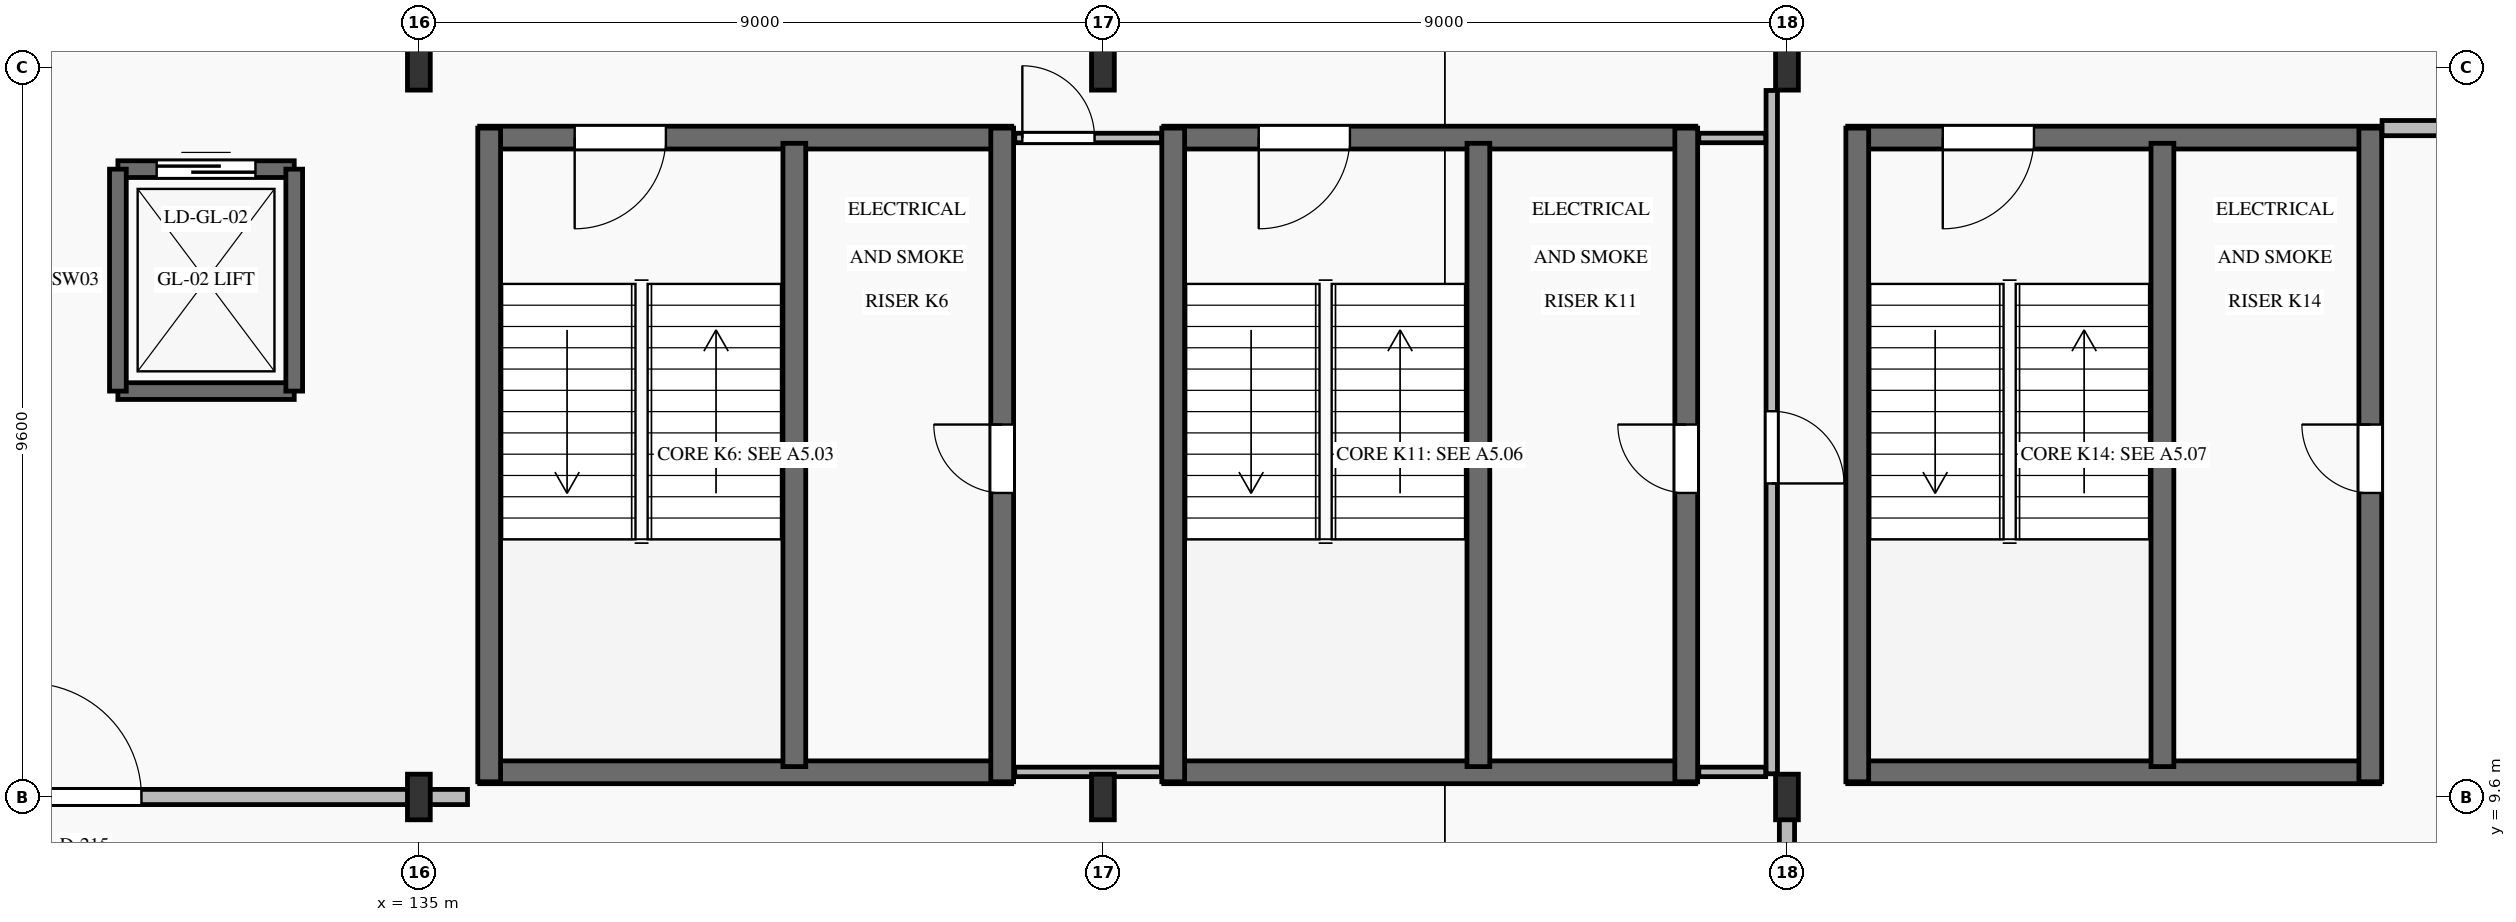
"""IFC4 building model, lengths in metres.
Left out: names, types, materials, properties, quantities, classifications, styles, units other than length and angle.
Written with IfcOpenShell. Run it as: python <this file> out.ifc"""

import sys

from ifc_helpers import new_model, si_unit, direction, frame, frame_2d, origin, origin_2d, place, context, subcontext, project, spatial, rectangle, i_section, extrude, element, fill, save


model = new_model("IFC4")
c1 = context("Model", 3, precision=1e-05, world=origin(), true_north=direction((0.0, 1.0)))
c2 = subcontext(c1, "Body", "Model", "MODEL_VIEW")
j1 = project(units=[si_unit("LENGTHUNIT", "METRE"), si_unit("PLANEANGLEUNIT", "RADIAN")], contexts=[c1])
p1 = place(None, origin())
s1 = spatial("IfcSite", under=j1, at=p1, CompositionType="ELEMENT")
p2 = place(p1, origin())
s2 = spatial("IfcBuilding", under=s1, at=p2, CompositionType="ELEMENT")
p3 = place(p2, frame((0.0, 0.0, -4.5)))
s3 = spatial("IfcBuildingStorey", under=s2, at=p3, CompositionType="ELEMENT", Elevation=-4.5)
for number, where, z_axis, x_axis in (
    (1, (135.0, 9.6, 0.0), (0.0, 0.0, 1.0), (1.0, 0.0, 0.0)),
    (2, (135.0, 19.2, 0.0), (0.0, 0.0, 1.0), (1.0, 0.0, 0.0)),
    (3, (144.0, 9.6, 0.0), (0.0, 0.0, 1.0), (1.0, 0.0, 0.0)),
    (4, (144.0, 19.2, 0.0), (0.0, 0.0, 1.0), (1.0, 0.0, 0.0)),
    (5, (153.0, 9.6, 0.0), (0.0, 0.0, 1.0), (1.0, 0.0, 0.0)),
    (6, (153.0, 19.2, 0.0), (0.0, 0.0, 1.0), (1.0, 0.0, 0.0)),
):
    element("IfcColumn", number, at=place(p3, frame(where, z_axis=z_axis, x_axis=x_axis)), inside=s3, PredefinedType="COLUMN", context=c2, shape_type="SweptSolid", body=[
        extrude(i_section(OverallWidth=0.3, OverallDepth=0.6, WebThickness=0.015, FlangeThickness=0.03, FilletRadius=0.027, at=origin_2d()), origin(), (0.0, 0.0, 1.0), 4.5),
    ])
p4 = place(p3, frame((135.8, 9.925, 0.0), z_axis=(0.0, 0.0, 1.0), x_axis=(1.0, 0.0, 0.0)))
e7 = element("IfcWall", 7, at=p4, inside=s3, PredefinedType="SHEAR", context=c2, shape_type="SweptSolid", body=[
    extrude(rectangle(XDim=7.0, YDim=0.3, at=frame_2d((3.5, 0.0))), origin(), (0.0, 0.0, 1.0), 4.5),
])
p5 = place(p3, frame((135.8, 18.275, 0.0), z_axis=(0.0, 0.0, 1.0), x_axis=(1.0, 0.0, 0.0)))
e8 = element("IfcWall", 8, at=p5, inside=s3, PredefinedType="SHEAR", context=c2, shape_type="SweptSolid", body=[
    extrude(rectangle(XDim=7.0, YDim=0.3, at=frame_2d((3.5, 0.0))), origin(), (0.0, 0.0, 1.0), 4.5),
])
p6 = place(p5, frame((1.25, 0.0, 0.0)))
e9 = element("IfcOpeningElement", 9, at=p6, cuts=e8, PredefinedType="OPENING", context=c2, shape_type="SweptSolid", body=[
    extrude(rectangle(XDim=1.2, YDim=2.15, at=frame_2d((0.6, 1.075))), frame((0.0, 0.165, 0.0), z_axis=(0.0, -1.0, 0.0), x_axis=(1.0, 0.0, 0.0)), (0.0, 0.0, 1.0), 0.33),
])
p7 = place(p3, frame((135.925, 9.8, 0.0), z_axis=(0.0, 0.0, 1.0), x_axis=(0.0, 1.0, 0.0)))
e10 = element("IfcWall", 10, at=p7, inside=s3, PredefinedType="SHEAR", context=c2, shape_type="SweptSolid", body=[
    extrude(rectangle(XDim=8.6, YDim=0.3, at=frame_2d((4.3, 0.0))), origin(), (0.0, 0.0, 1.0), 4.5),
])
p8 = place(p3, frame((142.675, 9.8, 0.0), z_axis=(0.0, 0.0, 1.0), x_axis=(0.0, 1.0, 0.0)))
e11 = element("IfcWall", 11, at=p8, inside=s3, PredefinedType="SHEAR", context=c2, shape_type="SweptSolid", body=[
    extrude(rectangle(XDim=8.6, YDim=0.3, at=frame_2d((4.3, 0.0))), origin(), (0.0, 0.0, 1.0), 4.5),
])
p9 = place(p8, frame((3.8, 0.0, 0.0)))
e12 = element("IfcOpeningElement", 12, at=p9, cuts=e11, PredefinedType="OPENING", context=c2, shape_type="SweptSolid", body=[
    extrude(rectangle(XDim=0.9, YDim=2.05, at=frame_2d((0.45, 1.025))), frame((0.0, 0.165, 0.0), z_axis=(0.0, -1.0, 0.0), x_axis=(1.0, 0.0, 0.0)), (0.0, 0.0, 1.0), 0.33),
])
p10 = place(p3, frame((139.94, 10.0, 0.0), z_axis=(0.0, 0.0, 1.0), x_axis=(0.0, 1.0, 0.0)))
e13 = element("IfcWall", 13, at=p10, inside=s3, PredefinedType="SHEAR", context=c2, shape_type="SweptSolid", body=[
    extrude(rectangle(XDim=8.2, YDim=0.3, at=frame_2d((4.1, 0.0))), origin(), (0.0, 0.0, 1.0), 4.5),
])
p11 = place(p3, frame((144.8, 9.925, 0.0), z_axis=(0.0, 0.0, 1.0), x_axis=(1.0, 0.0, 0.0)))
e14 = element("IfcWall", 14, at=p11, inside=s3, PredefinedType="SHEAR", context=c2, shape_type="SweptSolid", body=[
    extrude(rectangle(XDim=7.0, YDim=0.3, at=frame_2d((3.5, 0.0))), origin(), (0.0, 0.0, 1.0), 4.5),
])
p12 = place(p3, frame((144.8, 18.275, 0.0), z_axis=(0.0, 0.0, 1.0), x_axis=(1.0, 0.0, 0.0)))
e15 = element("IfcWall", 15, at=p12, inside=s3, PredefinedType="SHEAR", context=c2, shape_type="SweptSolid", body=[
    extrude(rectangle(XDim=7.0, YDim=0.3, at=frame_2d((3.5, 0.0))), origin(), (0.0, 0.0, 1.0), 4.5),
])
p13 = place(p12, frame((1.25, 0.0, 0.0)))
e16 = element("IfcOpeningElement", 16, at=p13, cuts=e15, PredefinedType="OPENING", context=c2, shape_type="SweptSolid", body=[
    extrude(rectangle(XDim=1.2, YDim=2.15, at=frame_2d((0.6, 1.075))), frame((0.0, 0.165, 0.0), z_axis=(0.0, -1.0, 0.0), x_axis=(1.0, 0.0, 0.0)), (0.0, 0.0, 1.0), 0.33),
])
p14 = place(p3, frame((144.925, 9.8, 0.0), z_axis=(0.0, 0.0, 1.0), x_axis=(0.0, 1.0, 0.0)))
e17 = element("IfcWall", 17, at=p14, inside=s3, PredefinedType="SHEAR", context=c2, shape_type="SweptSolid", body=[
    extrude(rectangle(XDim=8.6, YDim=0.3, at=frame_2d((4.3, 0.0))), origin(), (0.0, 0.0, 1.0), 4.5),
])
p15 = place(p3, frame((151.675, 9.8, 0.0), z_axis=(0.0, 0.0, 1.0), x_axis=(0.0, 1.0, 0.0)))
e18 = element("IfcWall", 18, at=p15, inside=s3, PredefinedType="SHEAR", context=c2, shape_type="SweptSolid", body=[
    extrude(rectangle(XDim=8.6, YDim=0.3, at=frame_2d((4.3, 0.0))), origin(), (0.0, 0.0, 1.0), 4.5),
])
p16 = place(p15, frame((3.8, 0.0, 0.0)))
e19 = element("IfcOpeningElement", 19, at=p16, cuts=e18, PredefinedType="OPENING", context=c2, shape_type="SweptSolid", body=[
    extrude(rectangle(XDim=0.9, YDim=2.05, at=frame_2d((0.45, 1.025))), frame((0.0, 0.165, 0.0), z_axis=(0.0, -1.0, 0.0), x_axis=(1.0, 0.0, 0.0)), (0.0, 0.0, 1.0), 0.33),
])
p17 = place(p3, frame((148.94, 10.0, 0.0), z_axis=(0.0, 0.0, 1.0), x_axis=(0.0, 1.0, 0.0)))
e20 = element("IfcWall", 20, at=p17, inside=s3, PredefinedType="SHEAR", context=c2, shape_type="SweptSolid", body=[
    extrude(rectangle(XDim=8.2, YDim=0.3, at=frame_2d((4.1, 0.0))), origin(), (0.0, 0.0, 1.0), 4.5),
])
p18 = place(p3, frame((153.8, 9.925, 0.0), z_axis=(0.0, 0.0, 1.0), x_axis=(1.0, 0.0, 0.0)))
e21 = element("IfcWall", 21, at=p18, inside=s3, PredefinedType="SHEAR", context=c2, shape_type="SweptSolid", body=[
    extrude(rectangle(XDim=7.0, YDim=0.3, at=frame_2d((3.5, 0.0))), origin(), (0.0, 0.0, 1.0), 4.5),
])
p19 = place(p3, frame((153.8, 18.275, 0.0), z_axis=(0.0, 0.0, 1.0), x_axis=(1.0, 0.0, 0.0)))
e22 = element("IfcWall", 22, at=p19, inside=s3, PredefinedType="SHEAR", context=c2, shape_type="SweptSolid", body=[
    extrude(rectangle(XDim=7.0, YDim=0.3, at=frame_2d((3.5, 0.0))), origin(), (0.0, 0.0, 1.0), 4.5),
])
p20 = place(p19, frame((1.25, 0.0, 0.0)))
e23 = element("IfcOpeningElement", 23, at=p20, cuts=e22, PredefinedType="OPENING", context=c2, shape_type="SweptSolid", body=[
    extrude(rectangle(XDim=1.2, YDim=2.15, at=frame_2d((0.6, 1.075))), frame((0.0, 0.165, 0.0), z_axis=(0.0, -1.0, 0.0), x_axis=(1.0, 0.0, 0.0)), (0.0, 0.0, 1.0), 0.33),
])
p21 = place(p3, frame((153.925, 9.8, 0.0), z_axis=(0.0, 0.0, 1.0), x_axis=(0.0, 1.0, 0.0)))
e24 = element("IfcWall", 24, at=p21, inside=s3, PredefinedType="SHEAR", context=c2, shape_type="SweptSolid", body=[
    extrude(rectangle(XDim=8.6, YDim=0.3, at=frame_2d((4.3, 0.0))), origin(), (0.0, 0.0, 1.0), 4.5),
])
p22 = place(p3, frame((160.675, 9.8, 0.0), z_axis=(0.0, 0.0, 1.0), x_axis=(0.0, 1.0, 0.0)))
e25 = element("IfcWall", 25, at=p22, inside=s3, PredefinedType="SHEAR", context=c2, shape_type="SweptSolid", body=[
    extrude(rectangle(XDim=8.6, YDim=0.3, at=frame_2d((4.3, 0.0))), origin(), (0.0, 0.0, 1.0), 4.5),
])
p23 = place(p22, frame((3.8, 0.0, 0.0)))
e26 = element("IfcOpeningElement", 26, at=p23, cuts=e25, PredefinedType="OPENING", context=c2, shape_type="SweptSolid", body=[
    extrude(rectangle(XDim=0.9, YDim=2.05, at=frame_2d((0.45, 1.025))), frame((0.0, 0.165, 0.0), z_axis=(0.0, -1.0, 0.0), x_axis=(1.0, 0.0, 0.0)), (0.0, 0.0, 1.0), 0.33),
])
p24 = place(p3, frame((157.94, 10.0, 0.0), z_axis=(0.0, 0.0, 1.0), x_axis=(0.0, 1.0, 0.0)))
e27 = element("IfcWall", 27, at=p24, inside=s3, PredefinedType="SHEAR", context=c2, shape_type="SweptSolid", body=[
    extrude(rectangle(XDim=8.2, YDim=0.3, at=frame_2d((4.1, 0.0))), origin(), (0.0, 0.0, 1.0), 4.5),
])
p25 = place(p3, frame((131.04, 14.94, 0.0), z_axis=(0.0, 0.0, 1.0), x_axis=(1.0, 0.0, 0.0)))
e28 = element("IfcWall", 28, at=p25, inside=s3, PredefinedType="SHEAR", context=c2, shape_type="SweptSolid", body=[
    extrude(rectangle(XDim=2.32, YDim=0.22, at=frame_2d((1.16, 0.0))), origin(), (0.0, 0.0, 1.0), 4.5),
])
p26 = place(p3, frame((131.04, 17.86, 0.0), z_axis=(0.0, 0.0, 1.0), x_axis=(1.0, 0.0, 0.0)))
e29 = element("IfcWall", 29, at=p26, inside=s3, PredefinedType="SHEAR", context=c2, shape_type="SweptSolid", body=[
    extrude(rectangle(XDim=2.32, YDim=0.22, at=frame_2d((1.16, 0.0))), origin(), (0.0, 0.0, 1.0), 4.5),
])
p27 = place(p26, frame((0.51, 0.0, 0.0)))
e30 = element("IfcOpeningElement", 30, at=p27, cuts=e29, PredefinedType="OPENING", context=c2, shape_type="SweptSolid", body=[
    extrude(rectangle(XDim=1.3, YDim=2.25, at=frame_2d((0.65, 1.125))), frame((0.0, 0.125, 0.0), z_axis=(0.0, -1.0, 0.0), x_axis=(1.0, 0.0, 0.0)), (0.0, 0.0, 1.0), 0.25),
])
for number, where, z_axis, x_axis in (
    (31, (131.04, 14.94, 0.0), (0.0, 0.0, 1.0), (0.0, 1.0, 0.0)),
    (32, (133.36, 14.94, 0.0), (0.0, 0.0, 1.0), (0.0, 1.0, 0.0)),
):
    element("IfcWall", number, at=place(p3, frame(where, z_axis=z_axis, x_axis=x_axis)), inside=s3, PredefinedType="SHEAR", context=c2, shape_type="SweptSolid", body=[
        extrude(rectangle(XDim=2.92, YDim=0.22, at=frame_2d((1.46, 0.0))), origin(), (0.0, 0.0, 1.0), 4.5),
    ])
p28 = place(p3, frame((160.83, 18.4, 0.0), z_axis=(0.0, 0.0, 1.0), x_axis=(1.0, 0.0, 0.0)))
e33 = element("IfcWall", 33, at=p28, inside=s3, PredefinedType="PARTITIONING", context=c2, shape_type="SweptSolid", body=[
    extrude(rectangle(XDim=18.535, YDim=0.2, at=frame_2d((9.268, 0.0))), origin(), (0.0, 0.0, 1.0), 4.2),
])
p29 = place(p28, frame((7.025, 0.0, 0.0)))
e34 = element("IfcOpeningElement", 34, at=p29, cuts=e33, PredefinedType="OPENING", context=c2, shape_type="SweptSolid", body=[
    extrude(rectangle(XDim=1.5, YDim=2.25, at=frame_2d((0.75, 1.125))), frame((0.0, 0.115, 0.0), z_axis=(0.0, -1.0, 0.0), x_axis=(1.0, 0.0, 0.0)), (0.0, 0.0, 1.0), 0.23),
])
p30 = place(p3, frame((152.8, 9.905, 0.0), z_axis=(0.0, 0.0, 1.0), x_axis=(0.0, 1.0, 0.0)))
e35 = element("IfcWall", 35, at=p30, inside=s3, PredefinedType="PARTITIONING", context=c2, shape_type="SweptSolid", body=[
    extrude(rectangle(XDim=8.99, YDim=0.15, at=frame_2d((4.495, 0.0))), origin(), (0.0, 0.0, 1.0), 3.66),
])
p31 = place(p30, frame((3.82, 0.0, 0.0)))
e36 = element("IfcOpeningElement", 36, at=p31, cuts=e35, PredefinedType="OPENING", context=c2, shape_type="SweptSolid", body=[
    extrude(rectangle(XDim=0.95, YDim=2.1, at=frame_2d((0.475, 1.05))), frame((0.0, 0.09, 0.0), z_axis=(0.0, -1.0, 0.0), x_axis=(1.0, 0.0, 0.0)), (0.0, 0.0, 1.0), 0.18),
])
p32 = place(p3, frame((125.56, 9.6, 0.0), z_axis=(0.0, 0.0, 1.0), x_axis=(1.0, 0.0, 0.0)))
e37 = element("IfcWall", 37, at=p32, inside=s3, PredefinedType="PARTITIONING", context=c2, shape_type="SweptSolid", body=[
    extrude(rectangle(XDim=10.08, YDim=0.2, at=frame_2d((5.04, 0.0))), origin(), (0.0, 0.0, 1.0), 3.61),
])
p33 = place(p32, frame((4.29, 0.0, 0.0)))
e38 = element("IfcOpeningElement", 38, at=p33, cuts=e37, PredefinedType="OPENING", context=c2, shape_type="SweptSolid", body=[
    extrude(rectangle(XDim=1.5, YDim=2.25, at=frame_2d((0.75, 1.125))), frame((0.0, 0.115, 0.0), z_axis=(0.0, -1.0, 0.0), x_axis=(1.0, 0.0, 0.0)), (0.0, 0.0, 1.0), 0.23),
])
p34 = place(p3, frame((153.0, 0.475, 0.0), z_axis=(0.0, 0.0, 1.0), x_axis=(0.0, 1.0, 0.0)))
e39 = element("IfcWall", 39, at=p34, inside=s3, PredefinedType="PARTITIONING", context=c2, shape_type="SweptSolid", body=[
    extrude(rectangle(XDim=8.875, YDim=0.2, at=frame_2d((4.438, 0.0))), origin(), (0.0, 0.0, 1.0), 4.2),
])
p35 = place(p3, frame((142.84, 18.27, 0.0), z_axis=(0.0, 0.0, 1.0), x_axis=(1.0, 0.0, 0.0)))
e40 = element("IfcWall", 40, at=p35, inside=s3, PredefinedType="PARTITIONING", context=c2, shape_type="SweptSolid", body=[
    extrude(rectangle(XDim=1.93, YDim=0.125, at=frame_2d((0.965, 0.0))), origin(), (0.0, 0.0, 1.0), 4.2),
])
p36 = place(p35, frame((0.1, 0.0, 0.0)))
e41 = element("IfcOpeningElement", 41, at=p36, cuts=e40, PredefinedType="OPENING", context=c2, shape_type="SweptSolid", body=[
    extrude(rectangle(XDim=0.95, YDim=2.1, at=frame_2d((0.475, 1.05))), frame((0.0, 0.077, 0.0), z_axis=(0.0, -1.0, 0.0), x_axis=(1.0, 0.0, 0.0)), (0.0, 0.0, 1.0), 0.155),
])
p37 = place(p3, frame((142.84, 9.93, 0.0), z_axis=(0.0, 0.0, 1.0), x_axis=(1.0, 0.0, 0.0)))
e42 = element("IfcWall", 42, at=p37, inside=s3, PredefinedType="PARTITIONING", context=c2, shape_type="SweptSolid", body=[
    extrude(rectangle(XDim=1.93, YDim=0.125, at=frame_2d((0.965, 0.0))), origin(), (0.0, 0.0, 1.0), 3.61),
])
p38 = place(p3, frame((151.84, 18.27, 0.0), z_axis=(0.0, 0.0, 1.0), x_axis=(1.0, 0.0, 0.0)))
e43 = element("IfcWall", 43, at=p38, inside=s3, PredefinedType="PARTITIONING", context=c2, shape_type="SweptSolid", body=[
    extrude(rectangle(XDim=0.88, YDim=0.125, at=frame_2d((0.44, 0.0))), origin(), (0.0, 0.0, 1.0), 4.2),
])
p39 = place(p3, frame((151.84, 9.93, 0.0), z_axis=(0.0, 0.0, 1.0), x_axis=(1.0, 0.0, 0.0)))
e44 = element("IfcWall", 44, at=p39, inside=s3, PredefinedType="PARTITIONING", context=c2, shape_type="SweptSolid", body=[
    extrude(rectangle(XDim=0.88, YDim=0.125, at=frame_2d((0.44, 0.0))), origin(), (0.0, 0.0, 1.0), 3.61),
])
p40 = place(p6, frame((1.2, 0.0, 0.0), z_axis=(0.0, 0.0, 1.0), x_axis=(-1.0, 0.0, 0.0)))
e45 = element("IfcDoor", 45, at=p40, inside=s3, OperationType="SINGLE_SWING_LEFT", PredefinedType="DOOR", context=c2, shape_type="SweptSolid", body=[
    extrude(rectangle(XDim=1.2, YDim=2.15, at=frame_2d((0.6, 1.075))), frame((0.0, 0.025, 0.0), z_axis=(0.0, -1.0, 0.0), x_axis=(1.0, 0.0, 0.0)), (0.0, 0.0, 1.0), 0.05),
])
fill(e9, e45)
p41 = place(p9, origin())
e46 = element("IfcDoor", 46, at=p41, inside=s3, OperationType="SINGLE_SWING_RIGHT", PredefinedType="DOOR", context=c2, shape_type="SweptSolid", body=[
    extrude(rectangle(XDim=0.9, YDim=2.05, at=frame_2d((0.45, 1.025))), frame((0.0, 0.025, 0.0), z_axis=(0.0, -1.0, 0.0), x_axis=(1.0, 0.0, 0.0)), (0.0, 0.0, 1.0), 0.05),
])
fill(e12, e46)
p42 = place(p13, frame((1.2, 0.0, 0.0), z_axis=(0.0, 0.0, 1.0), x_axis=(-1.0, 0.0, 0.0)))
e47 = element("IfcDoor", 47, at=p42, inside=s3, OperationType="SINGLE_SWING_LEFT", PredefinedType="DOOR", context=c2, shape_type="SweptSolid", body=[
    extrude(rectangle(XDim=1.2, YDim=2.15, at=frame_2d((0.6, 1.075))), frame((0.0, 0.025, 0.0), z_axis=(0.0, -1.0, 0.0), x_axis=(1.0, 0.0, 0.0)), (0.0, 0.0, 1.0), 0.05),
])
fill(e16, e47)
p43 = place(p16, origin())
e48 = element("IfcDoor", 48, at=p43, inside=s3, OperationType="SINGLE_SWING_RIGHT", PredefinedType="DOOR", context=c2, shape_type="SweptSolid", body=[
    extrude(rectangle(XDim=0.9, YDim=2.05, at=frame_2d((0.45, 1.025))), frame((0.0, 0.025, 0.0), z_axis=(0.0, -1.0, 0.0), x_axis=(1.0, 0.0, 0.0)), (0.0, 0.0, 1.0), 0.05),
])
fill(e19, e48)
p44 = place(p20, frame((1.2, 0.0, 0.0), z_axis=(0.0, 0.0, 1.0), x_axis=(-1.0, 0.0, 0.0)))
e49 = element("IfcDoor", 49, at=p44, inside=s3, OperationType="SINGLE_SWING_LEFT", PredefinedType="DOOR", context=c2, shape_type="SweptSolid", body=[
    extrude(rectangle(XDim=1.2, YDim=2.15, at=frame_2d((0.6, 1.075))), frame((0.0, 0.025, 0.0), z_axis=(0.0, -1.0, 0.0), x_axis=(1.0, 0.0, 0.0)), (0.0, 0.0, 1.0), 0.05),
])
fill(e23, e49)
p45 = place(p23, origin())
e50 = element("IfcDoor", 50, at=p45, inside=s3, OperationType="SINGLE_SWING_RIGHT", PredefinedType="DOOR", context=c2, shape_type="SweptSolid", body=[
    extrude(rectangle(XDim=0.9, YDim=2.05, at=frame_2d((0.45, 1.025))), frame((0.0, 0.025, 0.0), z_axis=(0.0, -1.0, 0.0), x_axis=(1.0, 0.0, 0.0)), (0.0, 0.0, 1.0), 0.05),
])
fill(e26, e50)
p46 = place(p27, origin())
e51 = element("IfcDoor", 51, at=p46, inside=s3, OperationType="SLIDING_TO_RIGHT", PredefinedType="DOOR", context=c2, shape_type="SweptSolid", body=[
    extrude(rectangle(XDim=1.3, YDim=2.25, at=frame_2d((0.65, 1.125))), frame((0.0, 0.025, 0.0), z_axis=(0.0, -1.0, 0.0), x_axis=(1.0, 0.0, 0.0)), (0.0, 0.0, 1.0), 0.05),
])
fill(e30, e51)
p47 = place(p31, frame((0.95, 0.0, 0.0), z_axis=(0.0, 0.0, 1.0), x_axis=(-1.0, 0.0, 0.0)))
e52 = element("IfcDoor", 52, at=p47, inside=s3, OperationType="SINGLE_SWING_LEFT", PredefinedType="DOOR", context=c2, shape_type="SweptSolid", body=[
    extrude(rectangle(XDim=0.95, YDim=2.1, at=frame_2d((0.475, 1.05))), frame((0.0, 0.025, 0.0), z_axis=(0.0, -1.0, 0.0), x_axis=(1.0, 0.0, 0.0)), (0.0, 0.0, 1.0), 0.05),
])
fill(e36, e52)
p48 = place(p33, origin())
e53 = element("IfcDoor", 53, at=p48, inside=s3, OperationType="SINGLE_SWING_LEFT", PredefinedType="DOOR", context=c2, shape_type="SweptSolid", body=[
    extrude(rectangle(XDim=1.5, YDim=2.25, at=frame_2d((0.75, 1.125))), frame((0.0, 0.025, 0.0), z_axis=(0.0, -1.0, 0.0), x_axis=(1.0, 0.0, 0.0)), (0.0, 0.0, 1.0), 0.05),
])
fill(e38, e53)
p49 = place(p36, origin())
e54 = element("IfcDoor", 54, at=p49, inside=s3, OperationType="SINGLE_SWING_LEFT", PredefinedType="DOOR", context=c2, shape_type="SweptSolid", body=[
    extrude(rectangle(XDim=0.95, YDim=2.1, at=frame_2d((0.475, 1.05))), frame((0.0, 0.025, 0.0), z_axis=(0.0, -1.0, 0.0), x_axis=(1.0, 0.0, 0.0)), (0.0, 0.0, 1.0), 0.05),
])
fill(e41, e54)
save(model, sys.argv[1])
